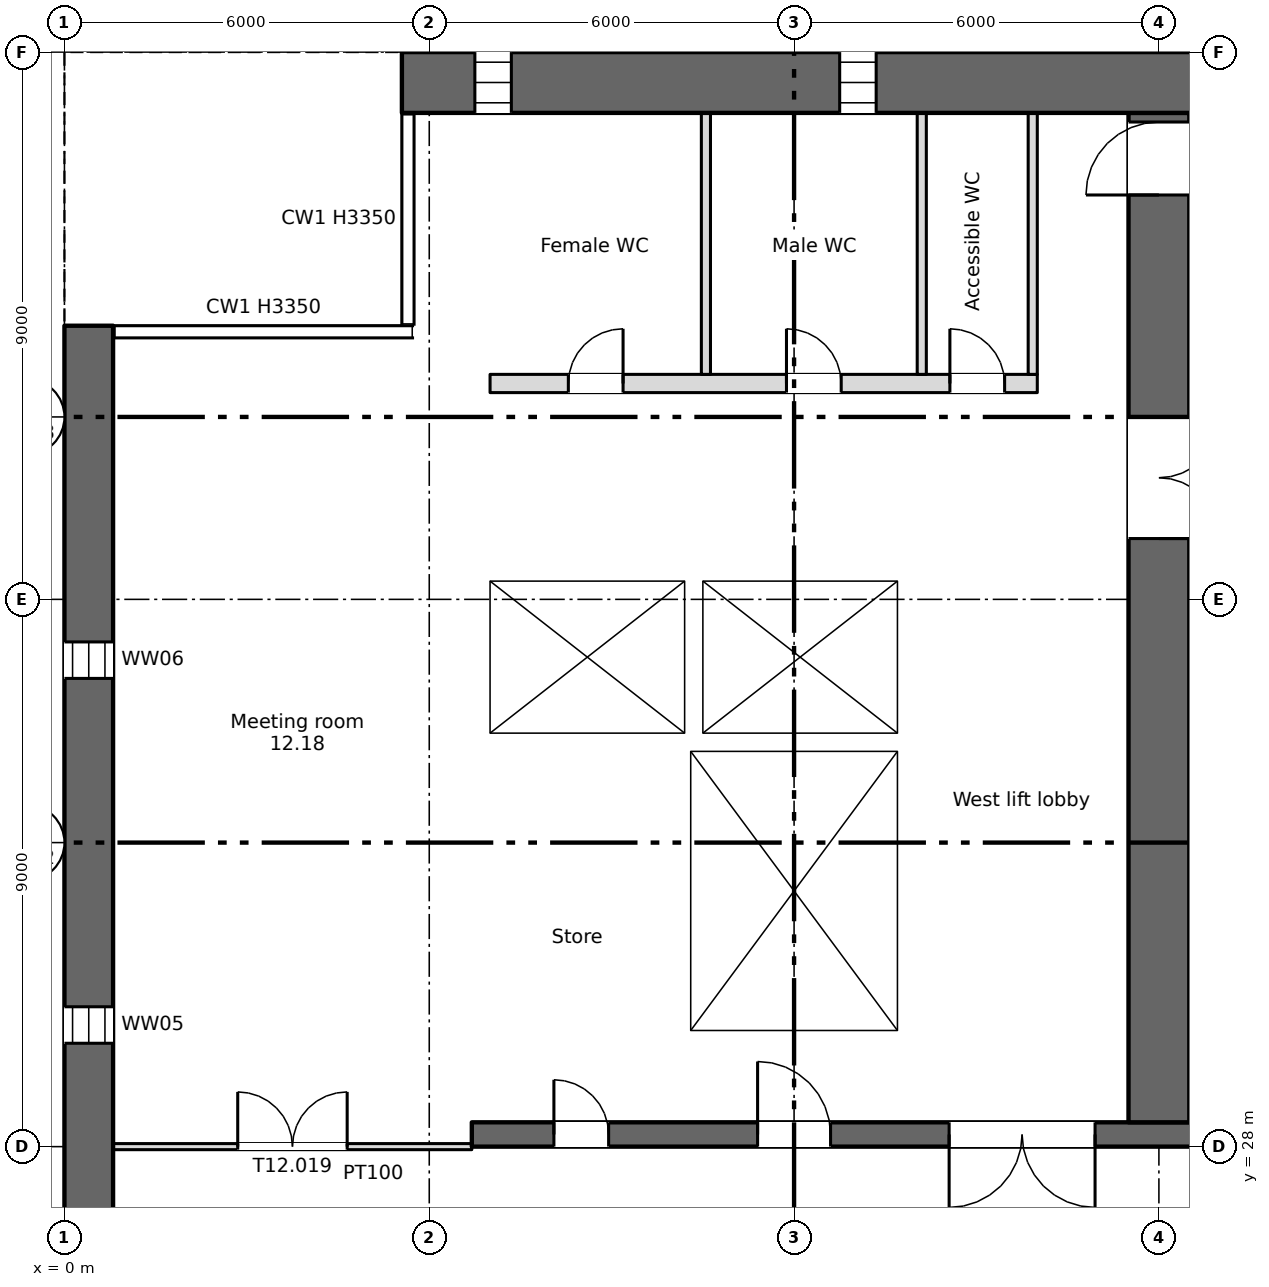
"""IFC4 building model, lengths in metres.
Left out: names, types, materials, properties, quantities, classifications, styles, units other than length and angle.
Written with IfcOpenShell. Run it as: python <this file> out.ifc"""

import sys

from ifc_helpers import new_model, si_unit, direction, frame, frame_2d, origin, place, context, subcontext, project, spatial, rectangle, extrude, element, fill, save


model = new_model("IFC4")
c1 = context("Model", 3, precision=1e-05, world=origin(), true_north=direction((0.0, 1.0)))
c2 = subcontext(c1, "Body", "Model", "MODEL_VIEW")
j1 = project(units=[si_unit("LENGTHUNIT", "METRE"), si_unit("PLANEANGLEUNIT", "RADIAN")], contexts=[c1])
p1 = place(None, origin())
s1 = spatial("IfcSite", under=j1, at=p1, CompositionType="ELEMENT")
p2 = place(p1, origin())
s2 = spatial("IfcBuilding", under=s1, at=p2, CompositionType="ELEMENT")
p3 = place(p2, frame((0.0, 0.0, 60.0)))
s3 = spatial("IfcBuildingStorey", under=s2, at=p3, CompositionType="ELEMENT", Elevation=60.0)
p4 = place(p3, frame((0.4, 4.5, 0.0), z_axis=(0.0, 0.0, 1.0), x_axis=(0.0, 1.0, 0.0)))
e1 = element("IfcWall", 1, at=p4, inside=s3, PredefinedType="SHEAR", context=c2, shape_type="SweptSolid", body=[
    extrude(rectangle(XDim=37.0, YDim=0.8, at=frame_2d((18.5, 0.0))), origin(), (0.0, 0.0, 1.0), 3.35),
])
p5 = place(p4, frame((1.2, 0.0, 0.6)))
e2 = element("IfcOpeningElement", 2, at=p5, cuts=e1, PredefinedType="OPENING", context=c2, shape_type="SweptSolid", body=[
    extrude(rectangle(XDim=0.6, YDim=2.4, at=frame_2d((0.3, 1.2))), frame((0.0, 0.41, 0.0), z_axis=(0.0, -1.0, 0.0), x_axis=(1.0, 0.0, 0.0)), (0.0, 0.0, 1.0), 0.82),
])
p6 = place(p4, frame((7.2, 0.0, 0.6)))
e3 = element("IfcOpeningElement", 3, at=p6, cuts=e1, PredefinedType="OPENING", context=c2, shape_type="SweptSolid", body=[
    extrude(rectangle(XDim=0.6, YDim=2.4, at=frame_2d((0.3, 1.2))), frame((0.0, 0.41, 0.0), z_axis=(0.0, -1.0, 0.0), x_axis=(1.0, 0.0, 0.0)), (0.0, 0.0, 1.0), 0.82),
])
p7 = place(p4, frame((13.2, 0.0, 0.6)))
e4 = element("IfcOpeningElement", 4, at=p7, cuts=e1, PredefinedType="OPENING", context=c2, shape_type="SweptSolid", body=[
    extrude(rectangle(XDim=0.6, YDim=2.4, at=frame_2d((0.3, 1.2))), frame((0.0, 0.41, 0.0), z_axis=(0.0, -1.0, 0.0), x_axis=(1.0, 0.0, 0.0)), (0.0, 0.0, 1.0), 0.82),
])
p8 = place(p4, frame((19.2, 0.0, 0.6)))
e5 = element("IfcOpeningElement", 5, at=p8, cuts=e1, PredefinedType="OPENING", context=c2, shape_type="SweptSolid", body=[
    extrude(rectangle(XDim=0.6, YDim=2.4, at=frame_2d((0.3, 1.2))), frame((0.0, 0.41, 0.0), z_axis=(0.0, -1.0, 0.0), x_axis=(1.0, 0.0, 0.0)), (0.0, 0.0, 1.0), 0.82),
])
p9 = place(p4, frame((25.2, 0.0, 0.6)))
e6 = element("IfcOpeningElement", 6, at=p9, cuts=e1, PredefinedType="OPENING", context=c2, shape_type="SweptSolid", body=[
    extrude(rectangle(XDim=0.6, YDim=2.4, at=frame_2d((0.3, 1.2))), frame((0.0, 0.41, 0.0), z_axis=(0.0, -1.0, 0.0), x_axis=(1.0, 0.0, 0.0)), (0.0, 0.0, 1.0), 0.82),
])
p10 = place(p4, frame((31.2, 0.0, 0.6)))
e7 = element("IfcOpeningElement", 7, at=p10, cuts=e1, PredefinedType="OPENING", context=c2, shape_type="SweptSolid", body=[
    extrude(rectangle(XDim=0.6, YDim=2.4, at=frame_2d((0.3, 1.2))), frame((0.0, 0.41, 0.0), z_axis=(0.0, -1.0, 0.0), x_axis=(1.0, 0.0, 0.0)), (0.0, 0.0, 1.0), 0.82),
])
p11 = place(p3, frame((5.55, 45.5, 0.0), z_axis=(0.0, 0.0, 1.0), x_axis=(1.0, 0.0, 0.0)))
e8 = element("IfcWall", 8, at=p11, inside=s3, PredefinedType="SHEAR", context=c2, shape_type="SweptSolid", body=[
    extrude(rectangle(XDim=66.9, YDim=1.0, at=frame_2d((33.45, 0.0))), origin(), (0.0, 0.0, 1.0), 3.35),
])
p12 = place(p11, frame((1.2, 0.0, 0.6)))
e9 = element("IfcOpeningElement", 9, at=p12, cuts=e8, PredefinedType="OPENING", context=c2, shape_type="SweptSolid", body=[
    extrude(rectangle(XDim=0.6, YDim=2.4, at=frame_2d((0.3, 1.2))), frame((0.0, 0.51, 0.0), z_axis=(0.0, -1.0, 0.0), x_axis=(1.0, 0.0, 0.0)), (0.0, 0.0, 1.0), 1.02),
])
p13 = place(p11, frame((7.2, 0.0, 0.6)))
e10 = element("IfcOpeningElement", 10, at=p13, cuts=e8, PredefinedType="OPENING", context=c2, shape_type="SweptSolid", body=[
    extrude(rectangle(XDim=0.6, YDim=2.4, at=frame_2d((0.3, 1.2))), frame((0.0, 0.51, 0.0), z_axis=(0.0, -1.0, 0.0), x_axis=(1.0, 0.0, 0.0)), (0.0, 0.0, 1.0), 1.02),
])
p14 = place(p11, frame((61.2, 0.0, 0.6)))
e11 = element("IfcOpeningElement", 11, at=p14, cuts=e8, PredefinedType="OPENING", context=c2, shape_type="SweptSolid", body=[
    extrude(rectangle(XDim=0.6, YDim=2.4, at=frame_2d((0.3, 1.2))), frame((0.0, 0.51, 0.0), z_axis=(0.0, -1.0, 0.0), x_axis=(1.0, 0.0, 0.0)), (0.0, 0.0, 1.0), 1.02),
])
p15 = place(p3, frame((6.7, 28.2, 0.0), z_axis=(0.0, 0.0, 1.0), x_axis=(1.0, 0.0, 0.0)))
e12 = element("IfcWall", 12, at=p15, inside=s3, PredefinedType="SHEAR", context=c2, shape_type="SweptSolid", body=[
    extrude(rectangle(XDim=57.8, YDim=0.4, at=frame_2d((28.9, 0.0))), origin(), (0.0, 0.0, 1.0), 3.35),
])
p16 = place(p15, frame((13.85, 0.0, 0.0)))
e13 = element("IfcOpeningElement", 13, at=p16, cuts=e12, PredefinedType="OPENING", context=c2, shape_type="SweptSolid", body=[
    extrude(rectangle(XDim=0.9, YDim=2.1, at=frame_2d((0.45, 1.05))), frame((0.0, 0.21, 0.0), z_axis=(0.0, -1.0, 0.0), x_axis=(1.0, 0.0, 0.0)), (0.0, 0.0, 1.0), 0.42),
])
p17 = place(p15, frame((48.562, 0.0, 0.0)))
e14 = element("IfcOpeningElement", 14, at=p17, cuts=e12, PredefinedType="OPENING", context=c2, shape_type="SweptSolid", body=[
    extrude(rectangle(XDim=0.9, YDim=2.1, at=frame_2d((0.45, 1.05))), frame((0.0, 0.21, 0.0), z_axis=(0.0, -1.0, 0.0), x_axis=(1.0, 0.0, 0.0)), (0.0, 0.0, 1.0), 0.42),
])
p18 = place(p15, frame((51.137, 0.0, 0.0)))
e15 = element("IfcOpeningElement", 15, at=p18, cuts=e12, PredefinedType="OPENING", context=c2, shape_type="SweptSolid", body=[
    extrude(rectangle(XDim=0.9, YDim=2.1, at=frame_2d((0.45, 1.05))), frame((0.0, 0.21, 0.0), z_axis=(0.0, -1.0, 0.0), x_axis=(1.0, 0.0, 0.0)), (0.0, 0.0, 1.0), 0.42),
])
p19 = place(p15, frame((1.35, 0.0, 0.0)))
e16 = element("IfcOpeningElement", 16, at=p19, cuts=e12, PredefinedType="OPENING", context=c2, shape_type="SweptSolid", body=[
    extrude(rectangle(XDim=0.9, YDim=2.1, at=frame_2d((0.45, 1.05))), frame((0.0, 0.21, 0.0), z_axis=(0.0, -1.0, 0.0), x_axis=(1.0, 0.0, 0.0)), (0.0, 0.0, 1.0), 0.42),
])
p20 = place(p15, frame((4.7, 0.0, 0.0)))
e17 = element("IfcOpeningElement", 17, at=p20, cuts=e12, PredefinedType="OPENING", context=c2, shape_type="SweptSolid", body=[
    extrude(rectangle(XDim=1.2, YDim=2.1, at=frame_2d((0.6, 1.05))), frame((0.0, 0.21, 0.0), z_axis=(0.0, -1.0, 0.0), x_axis=(1.0, 0.0, 0.0)), (0.0, 0.0, 1.0), 0.42),
])
p21 = place(p15, frame((31.7, 0.0, 0.0)))
e18 = element("IfcOpeningElement", 18, at=p21, cuts=e12, PredefinedType="OPENING", context=c2, shape_type="SweptSolid", body=[
    extrude(rectangle(XDim=1.2, YDim=2.1, at=frame_2d((0.6, 1.05))), frame((0.0, 0.21, 0.0), z_axis=(0.0, -1.0, 0.0), x_axis=(1.0, 0.0, 0.0)), (0.0, 0.0, 1.0), 0.42),
])
p22 = place(p15, frame((55.2, 0.0, 0.0)))
e19 = element("IfcOpeningElement", 19, at=p22, cuts=e12, PredefinedType="OPENING", context=c2, shape_type="SweptSolid", body=[
    extrude(rectangle(XDim=1.2, YDim=2.1, at=frame_2d((0.6, 1.05))), frame((0.0, 0.21, 0.0), z_axis=(0.0, -1.0, 0.0), x_axis=(1.0, 0.0, 0.0)), (0.0, 0.0, 1.0), 0.42),
])
p23 = place(p15, frame((21.7, 0.0, 0.0)))
e20 = element("IfcOpeningElement", 20, at=p23, cuts=e12, PredefinedType="OPENING", context=c2, shape_type="SweptSolid", body=[
    extrude(rectangle(XDim=1.2, YDim=2.1, at=frame_2d((0.6, 1.05))), frame((0.0, 0.21, 0.0), z_axis=(0.0, -1.0, 0.0), x_axis=(1.0, 0.0, 0.0)), (0.0, 0.0, 1.0), 0.42),
])
p24 = place(p15, frame((41.7, 0.0, 0.0)))
e21 = element("IfcOpeningElement", 21, at=p24, cuts=e12, PredefinedType="OPENING", context=c2, shape_type="SweptSolid", body=[
    extrude(rectangle(XDim=1.2, YDim=2.1, at=frame_2d((0.6, 1.05))), frame((0.0, 0.21, 0.0), z_axis=(0.0, -1.0, 0.0), x_axis=(1.0, 0.0, 0.0)), (0.0, 0.0, 1.0), 0.42),
])
p25 = place(p15, frame((24.85, 0.0, 0.0)))
e22 = element("IfcOpeningElement", 22, at=p25, cuts=e12, PredefinedType="OPENING", context=c2, shape_type="SweptSolid", body=[
    extrude(rectangle(XDim=2.4, YDim=2.1, at=frame_2d((1.2, 1.05))), frame((0.0, 0.21, 0.0), z_axis=(0.0, -1.0, 0.0), x_axis=(1.0, 0.0, 0.0)), (0.0, 0.0, 1.0), 0.42),
])
p26 = place(p15, frame((37.35, 0.0, 0.0)))
e23 = element("IfcOpeningElement", 23, at=p26, cuts=e12, PredefinedType="OPENING", context=c2, shape_type="SweptSolid", body=[
    extrude(rectangle(XDim=2.4, YDim=2.1, at=frame_2d((1.2, 1.05))), frame((0.0, 0.21, 0.0), z_axis=(0.0, -1.0, 0.0), x_axis=(1.0, 0.0, 0.0)), (0.0, 0.0, 1.0), 0.42),
])
p27 = place(p15, frame((7.85, 0.0, 0.0)))
e24 = element("IfcOpeningElement", 24, at=p27, cuts=e12, PredefinedType="OPENING", context=c2, shape_type="SweptSolid", body=[
    extrude(rectangle(XDim=2.4, YDim=2.1, at=frame_2d((1.2, 1.05))), frame((0.0, 0.21, 0.0), z_axis=(0.0, -1.0, 0.0), x_axis=(1.0, 0.0, 0.0)), (0.0, 0.0, 1.0), 0.42),
])
p28 = place(p15, frame((28.85, 0.0, 0.0)))
e25 = element("IfcOpeningElement", 25, at=p28, cuts=e12, PredefinedType="OPENING", context=c2, shape_type="SweptSolid", body=[
    extrude(rectangle(XDim=0.9, YDim=2.1, at=frame_2d((0.45, 1.05))), frame((0.0, 0.21, 0.0), z_axis=(0.0, -1.0, 0.0), x_axis=(1.0, 0.0, 0.0)), (0.0, 0.0, 1.0), 0.42),
])
p29 = place(p15, frame((34.85, 0.0, 0.0)))
e26 = element("IfcOpeningElement", 26, at=p29, cuts=e12, PredefinedType="OPENING", context=c2, shape_type="SweptSolid", body=[
    extrude(rectangle(XDim=0.9, YDim=2.1, at=frame_2d((0.45, 1.05))), frame((0.0, 0.21, 0.0), z_axis=(0.0, -1.0, 0.0), x_axis=(1.0, 0.0, 0.0)), (0.0, 0.0, 1.0), 0.42),
])
p30 = place(p3, frame((6.85, 28.4, 0.0), z_axis=(0.0, 0.0, 1.0), x_axis=(0.0, 1.0, 0.0)))
e27 = element("IfcWall", 27, at=p30, inside=s3, PredefinedType="SHEAR", context=c2, shape_type="SweptSolid", body=[
    extrude(rectangle(XDim=16.6, YDim=0.3, at=frame_2d((8.3, 0.0))), origin(), (0.0, 0.0, 1.0), 3.35),
])
p31 = place(p3, frame((18.0, 28.4, 0.0), z_axis=(0.0, 0.0, 1.0), x_axis=(0.0, 1.0, 0.0)))
e28 = element("IfcWall", 28, at=p31, inside=s3, PredefinedType="SHEAR", context=c2, shape_type="SweptSolid", body=[
    extrude(rectangle(XDim=16.6, YDim=1.0, at=frame_2d((8.3, 0.0))), origin(), (0.0, 0.0, 1.0), 3.35),
])
p32 = place(p31, frame((9.6, 0.0, 0.0)))
e29 = element("IfcOpeningElement", 29, at=p32, cuts=e28, PredefinedType="OPENING", context=c2, shape_type="SweptSolid", body=[
    extrude(rectangle(XDim=2.0, YDim=2.1, at=frame_2d((1.0, 1.05))), frame((0.0, 0.51, 0.0), z_axis=(0.0, -1.0, 0.0), x_axis=(1.0, 0.0, 0.0)), (0.0, 0.0, 1.0), 1.02),
])
p33 = place(p31, frame((15.25, 0.0, 0.0)))
e30 = element("IfcOpeningElement", 30, at=p33, cuts=e28, PredefinedType="OPENING", context=c2, shape_type="SweptSolid", body=[
    extrude(rectangle(XDim=1.2, YDim=2.1, at=frame_2d((0.6, 1.05))), frame((0.0, 0.51, 0.0), z_axis=(0.0, -1.0, 0.0), x_axis=(1.0, 0.0, 0.0)), (0.0, 0.0, 1.0), 1.02),
])
for number, where, z_axis, x_axis in (
    (31, (10.15, 28.4, 0.0), (0.0, 0.0, 1.0), (0.0, 1.0, 0.0)),
    (32, (13.85, 28.4, 0.0), (0.0, 0.0, 1.0), (0.0, 1.0, 0.0)),
):
    element("IfcWall", number, at=place(p3, frame(where, z_axis=z_axis, x_axis=x_axis)), inside=s3, PredefinedType="SHEAR", context=c2, shape_type="SweptSolid", body=[
        extrude(rectangle(XDim=6.1, YDim=0.3, at=frame_2d((3.05, 0.0))), origin(), (0.0, 0.0, 1.0), 3.35),
    ])
for number, where, z_axis, x_axis in (
    (33, (7.0, 34.65, 0.0), (0.0, 0.0, 1.0), (1.0, 0.0, 0.0)),
    (34, (7.0, 37.45, 0.0), (0.0, 0.0, 1.0), (1.0, 0.0, 0.0)),
):
    element("IfcWall", number, at=place(p3, frame(where, z_axis=z_axis, x_axis=x_axis)), inside=s3, PredefinedType="SHEAR", context=c2, shape_type="SweptSolid", body=[
        extrude(rectangle(XDim=7.0, YDim=0.3, at=frame_2d((3.5, 0.0))), origin(), (0.0, 0.0, 1.0), 3.35),
    ])
p34 = place(p3, frame((13.85, 34.8, 0.0), z_axis=(0.0, 0.0, 1.0), x_axis=(0.0, 1.0, 0.0)))
e35 = element("IfcWall", 35, at=p34, inside=s3, PredefinedType="SHEAR", context=c2, shape_type="SweptSolid", body=[
    extrude(rectangle(XDim=2.5, YDim=0.3, at=frame_2d((1.25, 0.0))), origin(), (0.0, 0.0, 1.0), 3.35),
])
p35 = place(p3, frame((7.0, 40.55, 0.0), z_axis=(0.0, 0.0, 1.0), x_axis=(1.0, 0.0, 0.0)))
e36 = element("IfcWall", 36, at=p35, inside=s3, PredefinedType="PARTITIONING", context=c2, shape_type="SweptSolid", body=[
    extrude(rectangle(XDim=9.0, YDim=0.3, at=frame_2d((4.5, 0.0))), origin(), (0.0, 0.0, 1.0), 3.35),
])
p36 = place(p35, frame((1.288, 0.0, 0.0)))
e37 = element("IfcOpeningElement", 37, at=p36, cuts=e36, PredefinedType="OPENING", context=c2, shape_type="SweptSolid", body=[
    extrude(rectangle(XDim=0.9, YDim=2.1, at=frame_2d((0.45, 1.05))), frame((0.0, 0.16, 0.0), z_axis=(0.0, -1.0, 0.0), x_axis=(1.0, 0.0, 0.0)), (0.0, 0.0, 1.0), 0.32),
])
p37 = place(p35, frame((4.875, 0.0, 0.0)))
e38 = element("IfcOpeningElement", 38, at=p37, cuts=e36, PredefinedType="OPENING", context=c2, shape_type="SweptSolid", body=[
    extrude(rectangle(XDim=0.9, YDim=2.1, at=frame_2d((0.45, 1.05))), frame((0.0, 0.16, 0.0), z_axis=(0.0, -1.0, 0.0), x_axis=(1.0, 0.0, 0.0)), (0.0, 0.0, 1.0), 0.32),
])
p38 = place(p35, frame((7.562, 0.0, 0.0)))
e39 = element("IfcOpeningElement", 39, at=p38, cuts=e36, PredefinedType="OPENING", context=c2, shape_type="SweptSolid", body=[
    extrude(rectangle(XDim=0.9, YDim=2.1, at=frame_2d((0.45, 1.05))), frame((0.0, 0.16, 0.0), z_axis=(0.0, -1.0, 0.0), x_axis=(1.0, 0.0, 0.0)), (0.0, 0.0, 1.0), 0.32),
])
p39 = place(p3, frame((10.35, 34.8, 0.0), z_axis=(0.0, 0.0, 1.0), x_axis=(0.0, 1.0, 0.0)))
e40 = element("IfcWall", 40, at=p39, inside=s3, PredefinedType="SHEAR", context=c2, shape_type="SweptSolid", body=[
    extrude(rectangle(XDim=2.5, YDim=0.3, at=frame_2d((1.25, 0.0))), origin(), (0.0, 0.0, 1.0), 3.35),
])
for number, where, z_axis, x_axis in (
    (41, (15.925, 40.7, 0.0), (0.0, 0.0, 1.0), (0.0, 1.0, 0.0)),
    (42, (10.55, 40.7, 0.0), (0.0, 0.0, 1.0), (0.0, 1.0, 0.0)),
    (43, (14.1, 40.7, 0.0), (0.0, 0.0, 1.0), (0.0, 1.0, 0.0)),
):
    element("IfcWall", number, at=place(p3, frame(where, z_axis=z_axis, x_axis=x_axis)), inside=s3, PredefinedType="PARTITIONING", context=c2, shape_type="SweptSolid", body=[
        extrude(rectangle(XDim=4.3, YDim=0.15, at=frame_2d((2.15, 0.0))), origin(), (0.0, 0.0, 1.0), 3.35),
    ])
p40 = place(p3, frame((0.8, 28.0, 0.0), z_axis=(0.0, 0.0, 1.0), x_axis=(1.0, 0.0, 0.0)))
e44 = element("IfcWall", 44, at=p40, inside=s3, PredefinedType="PARTITIONING", context=c2, shape_type="SweptSolid", body=[
    extrude(rectangle(XDim=5.9, YDim=0.1, at=frame_2d((2.95, 0.0))), origin(), (0.0, 0.0, 1.0), 3.35),
])
p41 = place(p40, frame((2.05, 0.0, 0.0)))
e45 = element("IfcOpeningElement", 45, at=p41, cuts=e44, PredefinedType="OPENING", context=c2, shape_type="SweptSolid", body=[
    extrude(rectangle(XDim=1.8, YDim=2.1, at=frame_2d((0.9, 1.05))), frame((0.0, 0.06, 0.0), z_axis=(0.0, -1.0, 0.0), x_axis=(1.0, 0.0, 0.0)), (0.0, 0.0, 1.0), 0.12),
])
p42 = place(p12, origin())
e46 = element("IfcWindow", 46, at=p42, inside=s3, PartitioningType="SINGLE_PANEL", PredefinedType="WINDOW", context=c2, shape_type="SweptSolid", body=[
    extrude(rectangle(XDim=0.6, YDim=2.4, at=frame_2d((0.3, 1.2))), frame((0.0, 0.03, 0.0), z_axis=(0.0, -1.0, 0.0), x_axis=(1.0, 0.0, 0.0)), (0.0, 0.0, 1.0), 0.06),
])
fill(e9, e46)
p43 = place(p13, origin())
e47 = element("IfcWindow", 47, at=p43, inside=s3, PartitioningType="SINGLE_PANEL", PredefinedType="WINDOW", context=c2, shape_type="SweptSolid", body=[
    extrude(rectangle(XDim=0.6, YDim=2.4, at=frame_2d((0.3, 1.2))), frame((0.0, 0.03, 0.0), z_axis=(0.0, -1.0, 0.0), x_axis=(1.0, 0.0, 0.0)), (0.0, 0.0, 1.0), 0.06),
])
fill(e10, e47)
p44 = place(p9, origin())
e48 = element("IfcWindow", 48, at=p44, inside=s3, PartitioningType="SINGLE_PANEL", PredefinedType="WINDOW", context=c2, shape_type="SweptSolid", body=[
    extrude(rectangle(XDim=0.6, YDim=2.4, at=frame_2d((0.3, 1.2))), frame((0.0, 0.03, 0.0), z_axis=(0.0, -1.0, 0.0), x_axis=(1.0, 0.0, 0.0)), (0.0, 0.0, 1.0), 0.06),
])
fill(e6, e48)
p45 = place(p10, origin())
e49 = element("IfcWindow", 49, at=p45, inside=s3, PartitioningType="SINGLE_PANEL", PredefinedType="WINDOW", context=c2, shape_type="SweptSolid", body=[
    extrude(rectangle(XDim=0.6, YDim=2.4, at=frame_2d((0.3, 1.2))), frame((0.0, 0.03, 0.0), z_axis=(0.0, -1.0, 0.0), x_axis=(1.0, 0.0, 0.0)), (0.0, 0.0, 1.0), 0.06),
])
fill(e7, e49)
p46 = place(p19, origin())
e50 = element("IfcDoor", 50, at=p46, inside=s3, OperationType="SINGLE_SWING_LEFT", PredefinedType="DOOR", context=c2, shape_type="SweptSolid", body=[
    extrude(rectangle(XDim=0.9, YDim=2.1, at=frame_2d((0.45, 1.05))), frame((0.0, 0.025, 0.0), z_axis=(0.0, -1.0, 0.0), x_axis=(1.0, 0.0, 0.0)), (0.0, 0.0, 1.0), 0.05),
])
fill(e16, e50)
p47 = place(p36, origin())
e51 = element("IfcDoor", 51, at=p47, inside=s3, OperationType="SINGLE_SWING_RIGHT", PredefinedType="DOOR", context=c2, shape_type="SweptSolid", body=[
    extrude(rectangle(XDim=0.9, YDim=2.1, at=frame_2d((0.45, 1.05))), frame((0.0, 0.025, 0.0), z_axis=(0.0, -1.0, 0.0), x_axis=(1.0, 0.0, 0.0)), (0.0, 0.0, 1.0), 0.05),
])
fill(e37, e51)
p48 = place(p37, origin())
e52 = element("IfcDoor", 52, at=p48, inside=s3, OperationType="SINGLE_SWING_LEFT", PredefinedType="DOOR", context=c2, shape_type="SweptSolid", body=[
    extrude(rectangle(XDim=0.9, YDim=2.1, at=frame_2d((0.45, 1.05))), frame((0.0, 0.025, 0.0), z_axis=(0.0, -1.0, 0.0), x_axis=(1.0, 0.0, 0.0)), (0.0, 0.0, 1.0), 0.05),
])
fill(e38, e52)
p49 = place(p38, origin())
e53 = element("IfcDoor", 53, at=p49, inside=s3, OperationType="SINGLE_SWING_LEFT", PredefinedType="DOOR", context=c2, shape_type="SweptSolid", body=[
    extrude(rectangle(XDim=0.9, YDim=2.1, at=frame_2d((0.45, 1.05))), frame((0.0, 0.025, 0.0), z_axis=(0.0, -1.0, 0.0), x_axis=(1.0, 0.0, 0.0)), (0.0, 0.0, 1.0), 0.05),
])
fill(e39, e53)
p50 = place(p20, origin())
e54 = element("IfcDoor", 54, at=p50, inside=s3, OperationType="SINGLE_SWING_LEFT", PredefinedType="DOOR", context=c2, shape_type="SweptSolid", body=[
    extrude(rectangle(XDim=1.2, YDim=2.1, at=frame_2d((0.6, 1.05))), frame((0.0, 0.025, 0.0), z_axis=(0.0, -1.0, 0.0), x_axis=(1.0, 0.0, 0.0)), (0.0, 0.0, 1.0), 0.05),
])
fill(e17, e54)
p51 = place(p27, origin())
e55 = element("IfcDoor", 55, at=p51, inside=s3, OperationType="DOUBLE_DOOR_SINGLE_SWING", PredefinedType="DOOR", context=c2, shape_type="SweptSolid", body=[
    extrude(rectangle(XDim=2.4, YDim=2.1, at=frame_2d((1.2, 1.05))), frame((0.0, 0.025, 0.0), z_axis=(0.0, -1.0, 0.0), x_axis=(1.0, 0.0, 0.0)), (0.0, 0.0, 1.0), 0.05),
])
fill(e24, e55)
p52 = place(p32, origin())
e56 = element("IfcDoor", 56, at=p52, inside=s3, OperationType="DOUBLE_DOOR_SINGLE_SWING", PredefinedType="DOOR", context=c2, shape_type="SweptSolid", body=[
    extrude(rectangle(XDim=2.0, YDim=2.1, at=frame_2d((1.0, 1.05))), frame((0.0, 0.025, 0.0), z_axis=(0.0, -1.0, 0.0), x_axis=(1.0, 0.0, 0.0)), (0.0, 0.0, 1.0), 0.05),
])
fill(e29, e56)
p53 = place(p33, origin())
e57 = element("IfcDoor", 57, at=p53, inside=s3, OperationType="SINGLE_SWING_LEFT", PredefinedType="DOOR", context=c2, shape_type="SweptSolid", body=[
    extrude(rectangle(XDim=1.2, YDim=2.1, at=frame_2d((0.6, 1.05))), frame((0.0, 0.025, 0.0), z_axis=(0.0, -1.0, 0.0), x_axis=(1.0, 0.0, 0.0)), (0.0, 0.0, 1.0), 0.05),
])
fill(e30, e57)
p54 = place(p41, origin())
e58 = element("IfcDoor", 58, at=p54, inside=s3, OperationType="DOUBLE_DOOR_SINGLE_SWING", PredefinedType="DOOR", context=c2, shape_type="SweptSolid", body=[
    extrude(rectangle(XDim=1.8, YDim=2.1, at=frame_2d((0.9, 1.05))), frame((0.0, 0.025, 0.0), z_axis=(0.0, -1.0, 0.0), x_axis=(1.0, 0.0, 0.0)), (0.0, 0.0, 1.0), 0.05),
])
fill(e45, e58)
save(model, sys.argv[1])
